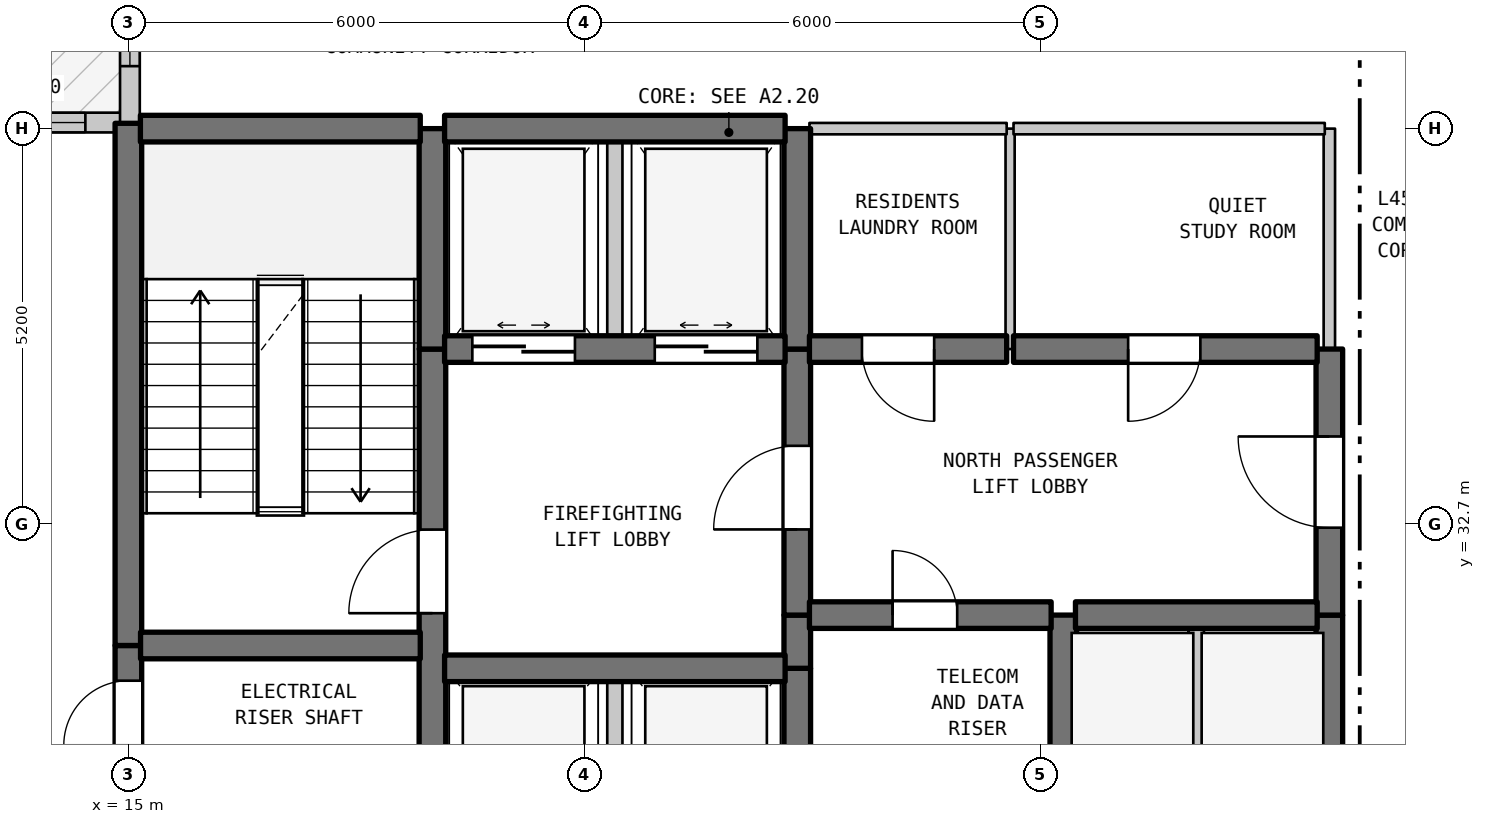
"""IFC4 building model, lengths in metres.
Left out: names, types, materials, properties, quantities, classifications, styles, units other than length and angle.
Written with IfcOpenShell. Run it as: python <this file> out.ifc"""

import sys

from ifc_helpers import new_model, si_unit, direction, frame, frame_2d, origin, place, context, subcontext, project, spatial, rectangle, extrude, element, fill, save


model = new_model("IFC4")
c1 = context("Model", 3, precision=1e-05, world=origin(), true_north=direction((0.0, 1.0)))
c2 = subcontext(c1, "Body", "Model", "MODEL_VIEW")
j1 = project(units=[si_unit("LENGTHUNIT", "METRE"), si_unit("PLANEANGLEUNIT", "RADIAN")], contexts=[c1])
p1 = place(None, origin())
s1 = spatial("IfcSite", under=j1, at=p1, CompositionType="ELEMENT")
p2 = place(p1, origin())
s2 = spatial("IfcBuilding", under=s1, at=p2, CompositionType="ELEMENT")
p3 = place(p2, frame((0.0, 0.0, 183.9)))
s3 = spatial("IfcBuildingStorey", under=s2, at=p3, CompositionType="ELEMENT", Elevation=183.9)
p4 = place(p3, frame((8.877, 37.98, 0.0), z_axis=(0.0, 0.0, 1.0), x_axis=(1.0, 0.0, 0.0)))
e1 = element("IfcWall", 1, at=p4, inside=s3, PredefinedType="STANDARD", context=c2, shape_type="SweptSolid", body=[
    extrude(rectangle(XDim=6.143, YDim=0.26, at=frame_2d((3.072, 0.0))), origin(), (0.0, 0.0, 1.0), 3.89),
])
p5 = place(p4, frame((1.424, 0.0, 0.0)))
e2 = element("IfcOpeningElement", 2, at=p5, cuts=e1, PredefinedType="OPENING", context=c2, shape_type="SweptSolid", body=[
    extrude(rectangle(XDim=1.4, YDim=2.2, at=frame_2d((0.7, 1.1))), frame((0.0, 0.14, 0.0), z_axis=(0.0, -1.0, 0.0), x_axis=(1.0, 0.0, 0.0)), (0.0, 0.0, 1.0), 0.28),
])
p6 = place(p4, frame((4.157, 0.0, 0.9)))
e3 = element("IfcOpeningElement", 3, at=p6, cuts=e1, PredefinedType="OPENING", context=c2, shape_type="SweptSolid", body=[
    extrude(rectangle(XDim=1.4, YDim=1.85, at=frame_2d((0.7, 0.925))), frame((0.0, 0.14, 0.0), z_axis=(0.0, -1.0, 0.0), x_axis=(1.0, 0.0, 0.0)), (0.0, 0.0, 1.0), 0.28),
])
p7 = place(p3, frame((15.02, 37.98, 0.0), z_axis=(0.0, 0.0, 1.0), x_axis=(0.0, 1.0, 0.0)))
e4 = element("IfcWall", 4, at=p7, inside=s3, PredefinedType="STANDARD", context=c2, shape_type="SweptSolid", body=[
    extrude(rectangle(XDim=15.276, YDim=0.26, at=frame_2d((7.638, 0.0))), origin(), (0.0, 0.0, 1.0), 4.19),
])
p8 = place(p7, frame((0.742, 0.0, 0.85)))
e5 = element("IfcOpeningElement", 5, at=p8, cuts=e4, PredefinedType="OPENING", context=c2, shape_type="SweptSolid", body=[
    extrude(rectangle(XDim=1.3, YDim=1.9, at=frame_2d((0.65, 0.95))), frame((0.0, 0.14, 0.0), z_axis=(0.0, -1.0, 0.0), x_axis=(1.0, 0.0, 0.0)), (0.0, 0.0, 1.0), 0.28),
])
p9 = place(p7, frame((5.276, 0.0, 0.85)))
e6 = element("IfcOpeningElement", 6, at=p9, cuts=e4, PredefinedType="OPENING", context=c2, shape_type="SweptSolid", body=[
    extrude(rectangle(XDim=1.3, YDim=1.9, at=frame_2d((0.65, 0.95))), frame((0.0, 0.14, 0.0), z_axis=(0.0, -1.0, 0.0), x_axis=(1.0, 0.0, 0.0)), (0.0, 0.0, 1.0), 0.28),
])
p10 = place(p7, frame((8.96, 0.0, 0.85)))
e7 = element("IfcOpeningElement", 7, at=p10, cuts=e4, PredefinedType="OPENING", context=c2, shape_type="SweptSolid", body=[
    extrude(rectangle(XDim=1.3, YDim=1.9, at=frame_2d((0.65, 0.95))), frame((0.0, 0.14, 0.0), z_axis=(0.0, -1.0, 0.0), x_axis=(1.0, 0.0, 0.0)), (0.0, 0.0, 1.0), 0.28),
])
p11 = place(p7, frame((12.644, 0.0, 0.85)))
e8 = element("IfcOpeningElement", 8, at=p11, cuts=e4, PredefinedType="OPENING", context=c2, shape_type="SweptSolid", body=[
    extrude(rectangle(XDim=1.3, YDim=1.9, at=frame_2d((0.65, 0.95))), frame((0.0, 0.14, 0.0), z_axis=(0.0, -1.0, 0.0), x_axis=(1.0, 0.0, 0.0)), (0.0, 0.0, 1.0), 0.28),
])
p12 = place(p3, frame((15.0, 29.5, 0.0), z_axis=(0.0, 0.0, 1.0), x_axis=(0.0, 1.0, 0.0)))
e9 = element("IfcWall", 9, at=p12, inside=s3, PredefinedType="SHEAR", context=c2, shape_type="SweptSolid", body=[
    extrude(rectangle(XDim=1.6, YDim=0.35, at=frame_2d((0.8, 0.0))), origin(), (0.0, 0.0, 1.0), 4.19),
])
p13 = place(p12, frame((0.287, 0.0, 0.0)))
e10 = element("IfcOpeningElement", 10, at=p13, cuts=e9, PredefinedType="OPENING", context=c2, shape_type="SweptSolid", body=[
    extrude(rectangle(XDim=0.85, YDim=2.1, at=frame_2d((0.425, 1.05))), frame((0.0, 0.185, 0.0), z_axis=(0.0, -1.0, 0.0), x_axis=(1.0, 0.0, 0.0)), (0.0, 0.0, 1.0), 0.37),
])
p14 = place(p3, frame((15.0, 31.1, 0.0), z_axis=(0.0, 0.0, 1.0), x_axis=(0.0, 1.0, 0.0)))
e11 = element("IfcWall", 11, at=p14, inside=s3, PredefinedType="SHEAR", context=c2, shape_type="SweptSolid", body=[
    extrude(rectangle(XDim=6.87, YDim=0.35, at=frame_2d((3.435, 0.0))), origin(), (0.0, 0.0, 1.0), 4.19),
])
p15 = place(p3, frame((19.0, 29.5, 0.0), z_axis=(0.0, 0.0, 1.0), x_axis=(0.0, 1.0, 0.0)))
e12 = element("IfcWall", 12, at=p15, inside=s3, PredefinedType="SHEAR", context=c2, shape_type="SweptSolid", body=[
    extrude(rectangle(XDim=5.5, YDim=0.35, at=frame_2d((2.75, 0.0))), origin(), (0.0, 0.0, 1.0), 4.19),
])
p16 = place(p15, frame((2.025, 0.0, 0.0)))
e13 = element("IfcOpeningElement", 13, at=p16, cuts=e12, PredefinedType="OPENING", context=c2, shape_type="SweptSolid", body=[
    extrude(rectangle(XDim=1.1, YDim=2.15, at=frame_2d((0.55, 1.075))), frame((0.0, 0.185, 0.0), z_axis=(0.0, -1.0, 0.0), x_axis=(1.0, 0.0, 0.0)), (0.0, 0.0, 1.0), 0.37),
])
p17 = place(p3, frame((19.0, 35.0, 0.0), z_axis=(0.0, 0.0, 1.0), x_axis=(0.0, 1.0, 0.0)))
e14 = element("IfcWall", 14, at=p17, inside=s3, PredefinedType="SHEAR", context=c2, shape_type="SweptSolid", body=[
    extrude(rectangle(XDim=2.9, YDim=0.35, at=frame_2d((1.45, 0.0))), origin(), (0.0, 0.0, 1.0), 4.19),
])
p18 = place(p3, frame((21.4, 28.2, 0.0), z_axis=(0.0, 0.0, 1.0), x_axis=(0.0, 1.0, 0.0)))
e15 = element("IfcWall", 15, at=p18, inside=s3, PredefinedType="STANDARD", context=c2, shape_type="SweptSolid", body=[
    extrude(rectangle(XDim=2.6, YDim=0.2, at=frame_2d((1.3, 0.0))), origin(), (0.0, 0.0, 1.0), 4.19),
])
p19 = place(p3, frame((21.4, 35.0, 0.0), z_axis=(0.0, 0.0, 1.0), x_axis=(0.0, 1.0, 0.0)))
e16 = element("IfcWall", 16, at=p19, inside=s3, PredefinedType="STANDARD", context=c2, shape_type="SweptSolid", body=[
    extrude(rectangle(XDim=2.9, YDim=0.2, at=frame_2d((1.45, 0.0))), origin(), (0.0, 0.0, 1.0), 4.19),
])
p20 = place(p3, frame((23.8, 29.5, 0.0), z_axis=(0.0, 0.0, 1.0), x_axis=(0.0, 1.0, 0.0)))
e17 = element("IfcWall", 17, at=p20, inside=s3, PredefinedType="SHEAR", context=c2, shape_type="SweptSolid", body=[
    extrude(rectangle(XDim=1.3, YDim=0.35, at=frame_2d((0.65, 0.0))), origin(), (0.0, 0.0, 1.0), 4.19),
])
p21 = place(p3, frame((23.8, 30.8, 0.0), z_axis=(0.0, 0.0, 1.0), x_axis=(0.0, 1.0, 0.0)))
e18 = element("IfcWall", 18, at=p21, inside=s3, PredefinedType="SHEAR", context=c2, shape_type="SweptSolid", body=[
    extrude(rectangle(XDim=0.7, YDim=0.35, at=frame_2d((0.35, 0.0))), origin(), (0.0, 0.0, 1.0), 4.19),
])
p22 = place(p3, frame((23.8, 31.5, 0.0), z_axis=(0.0, 0.0, 1.0), x_axis=(0.0, 1.0, 0.0)))
e19 = element("IfcWall", 19, at=p22, inside=s3, PredefinedType="SHEAR", context=c2, shape_type="SweptSolid", body=[
    extrude(rectangle(XDim=3.5, YDim=0.35, at=frame_2d((1.75, 0.0))), origin(), (0.0, 0.0, 1.0), 4.19),
])
p23 = place(p22, frame((1.127, 0.0, 0.0)))
e20 = element("IfcOpeningElement", 20, at=p23, cuts=e19, PredefinedType="OPENING", context=c2, shape_type="SweptSolid", body=[
    extrude(rectangle(XDim=1.1, YDim=2.15, at=frame_2d((0.55, 1.075))), frame((0.0, 0.185, 0.0), z_axis=(0.0, -1.0, 0.0), x_axis=(1.0, 0.0, 0.0)), (0.0, 0.0, 1.0), 0.37),
])
p24 = place(p3, frame((23.8, 35.0, 0.0), z_axis=(0.0, 0.0, 1.0), x_axis=(0.0, 1.0, 0.0)))
e21 = element("IfcWall", 21, at=p24, inside=s3, PredefinedType="SHEAR", context=c2, shape_type="SweptSolid", body=[
    extrude(rectangle(XDim=2.9, YDim=0.35, at=frame_2d((1.45, 0.0))), origin(), (0.0, 0.0, 1.0), 4.19),
])
p25 = place(p3, frame((26.6, 35.0, 0.0), z_axis=(0.0, 0.0, 1.0), x_axis=(0.0, 1.0, 0.0)))
e22 = element("IfcWall", 22, at=p25, inside=s3, PredefinedType="PARTITIONING", context=c2, shape_type="SweptSolid", body=[
    extrude(rectangle(XDim=2.9, YDim=0.12, at=frame_2d((1.45, 0.0))), origin(), (0.0, 0.0, 1.0), 4.19),
])
p26 = place(p3, frame((27.3, 29.5, 0.0), z_axis=(0.0, 0.0, 1.0), x_axis=(0.0, 1.0, 0.0)))
e23 = element("IfcWall", 23, at=p26, inside=s3, PredefinedType="SHEAR", context=c2, shape_type="SweptSolid", body=[
    extrude(rectangle(XDim=2.0, YDim=0.35, at=frame_2d((1.0, 0.0))), origin(), (0.0, 0.0, 1.0), 4.19),
])
p27 = place(p3, frame((29.05, 28.9, 0.0), z_axis=(0.0, 0.0, 1.0), x_axis=(0.0, 1.0, 0.0)))
e24 = element("IfcWall", 24, at=p27, inside=s3, PredefinedType="STANDARD", context=c2, shape_type="SweptSolid", body=[
    extrude(rectangle(XDim=2.6, YDim=0.2, at=frame_2d((1.3, 0.0))), origin(), (0.0, 0.0, 1.0), 4.19),
])
p28 = place(p3, frame((30.8, 28.9, 0.0), z_axis=(0.0, 0.0, 1.0), x_axis=(0.0, 1.0, 0.0)))
e25 = element("IfcWall", 25, at=p28, inside=s3, PredefinedType="SHEAR", context=c2, shape_type="SweptSolid", body=[
    extrude(rectangle(XDim=2.6, YDim=0.35, at=frame_2d((1.3, 0.0))), origin(), (0.0, 0.0, 1.0), 4.19),
])
p29 = place(p3, frame((30.8, 31.5, 0.0), z_axis=(0.0, 0.0, 1.0), x_axis=(0.0, 1.0, 0.0)))
e26 = element("IfcWall", 26, at=p29, inside=s3, PredefinedType="SHEAR", context=c2, shape_type="SweptSolid", body=[
    extrude(rectangle(XDim=3.5, YDim=0.35, at=frame_2d((1.75, 0.0))), origin(), (0.0, 0.0, 1.0), 4.19),
])
p30 = place(p29, frame((1.15, 0.0, 0.0)))
e27 = element("IfcOpeningElement", 27, at=p30, cuts=e26, PredefinedType="OPENING", context=c2, shape_type="SweptSolid", body=[
    extrude(rectangle(XDim=1.2, YDim=2.2, at=frame_2d((0.6, 1.1))), frame((0.0, 0.185, 0.0), z_axis=(0.0, -1.0, 0.0), x_axis=(1.0, 0.0, 0.0)), (0.0, 0.0, 1.0), 0.37),
])
p31 = place(p3, frame((30.8, 35.0, 0.0), z_axis=(0.0, 0.0, 1.0), x_axis=(0.0, 1.0, 0.0)))
e28 = element("IfcWall", 28, at=p31, inside=s3, PredefinedType="STANDARD", context=c2, shape_type="SweptSolid", body=[
    extrude(rectangle(XDim=2.9, YDim=0.15, at=frame_2d((1.45, 0.0))), origin(), (0.0, 0.0, 1.0), 4.19),
])
p32 = place(p3, frame((19.16, 30.8, 0.0), z_axis=(0.0, 0.0, 1.0), x_axis=(1.0, 0.0, 0.0)))
e29 = element("IfcWall", 29, at=p32, inside=s3, PredefinedType="SHEAR", context=c2, shape_type="SweptSolid", body=[
    extrude(rectangle(XDim=4.48, YDim=0.35, at=frame_2d((2.24, 0.0))), origin(), (0.0, 0.0, 1.0), 4.19),
])
p33 = place(p3, frame((15.16, 31.1, 0.0), z_axis=(0.0, 0.0, 1.0), x_axis=(1.0, 0.0, 0.0)))
e30 = element("IfcWall", 30, at=p33, inside=s3, PredefinedType="SHEAR", context=c2, shape_type="SweptSolid", body=[
    extrude(rectangle(XDim=3.68, YDim=0.35, at=frame_2d((1.84, 0.0))), origin(), (0.0, 0.0, 1.0), 4.19),
])
p34 = place(p3, frame((23.96, 31.5, 0.0), z_axis=(0.0, 0.0, 1.0), x_axis=(1.0, 0.0, 0.0)))
e31 = element("IfcWall", 31, at=p34, inside=s3, PredefinedType="SHEAR", context=c2, shape_type="SweptSolid", body=[
    extrude(rectangle(XDim=3.18, YDim=0.35, at=frame_2d((1.59, 0.0))), origin(), (0.0, 0.0, 1.0), 4.19),
])
p35 = place(p34, frame((1.094, 0.0, 0.0)))
e32 = element("IfcOpeningElement", 32, at=p35, cuts=e31, PredefinedType="OPENING", context=c2, shape_type="SweptSolid", body=[
    extrude(rectangle(XDim=0.85, YDim=2.1, at=frame_2d((0.425, 1.05))), frame((0.0, 0.185, 0.0), z_axis=(0.0, -1.0, 0.0), x_axis=(1.0, 0.0, 0.0)), (0.0, 0.0, 1.0), 0.37),
])
p36 = place(p3, frame((27.46, 31.5, 0.0), z_axis=(0.0, 0.0, 1.0), x_axis=(1.0, 0.0, 0.0)))
e33 = element("IfcWall", 33, at=p36, inside=s3, PredefinedType="SHEAR", context=c2, shape_type="SweptSolid", body=[
    extrude(rectangle(XDim=3.18, YDim=0.35, at=frame_2d((1.59, 0.0))), origin(), (0.0, 0.0, 1.0), 4.19),
])
p37 = place(p3, frame((19.16, 35.0, 0.0), z_axis=(0.0, 0.0, 1.0), x_axis=(1.0, 0.0, 0.0)))
e34 = element("IfcWall", 34, at=p37, inside=s3, PredefinedType="SHEAR", context=c2, shape_type="SweptSolid", body=[
    extrude(rectangle(XDim=4.48, YDim=0.35, at=frame_2d((2.24, 0.0))), origin(), (0.0, 0.0, 1.0), 4.19),
])
p38 = place(p37, frame((0.365, 0.0, 0.0)))
e35 = element("IfcOpeningElement", 35, at=p38, cuts=e34, PredefinedType="OPENING", context=c2, shape_type="SweptSolid", body=[
    extrude(rectangle(XDim=1.35, YDim=2.2, at=frame_2d((0.675, 1.1))), frame((0.0, 0.185, 0.0), z_axis=(0.0, -1.0, 0.0), x_axis=(1.0, 0.0, 0.0)), (0.0, 0.0, 1.0), 0.37),
])
p39 = place(p37, frame((2.765, 0.0, 0.0)))
e36 = element("IfcOpeningElement", 36, at=p39, cuts=e34, PredefinedType="OPENING", context=c2, shape_type="SweptSolid", body=[
    extrude(rectangle(XDim=1.35, YDim=2.2, at=frame_2d((0.675, 1.1))), frame((0.0, 0.185, 0.0), z_axis=(0.0, -1.0, 0.0), x_axis=(1.0, 0.0, 0.0)), (0.0, 0.0, 1.0), 0.37),
])
p40 = place(p3, frame((23.96, 35.0, 0.0), z_axis=(0.0, 0.0, 1.0), x_axis=(1.0, 0.0, 0.0)))
e37 = element("IfcWall", 37, at=p40, inside=s3, PredefinedType="SHEAR", context=c2, shape_type="SweptSolid", body=[
    extrude(rectangle(XDim=2.595, YDim=0.35, at=frame_2d((1.297, 0.0))), origin(), (0.0, 0.0, 1.0), 4.19),
])
p41 = place(p40, frame((0.691, 0.0, 0.0)))
e38 = element("IfcOpeningElement", 38, at=p41, cuts=e37, PredefinedType="OPENING", context=c2, shape_type="SweptSolid", body=[
    extrude(rectangle(XDim=0.95, YDim=2.15, at=frame_2d((0.475, 1.075))), frame((0.0, 0.185, 0.0), z_axis=(0.0, -1.0, 0.0), x_axis=(1.0, 0.0, 0.0)), (0.0, 0.0, 1.0), 0.37),
])
p42 = place(p3, frame((26.645, 35.0, 0.0), z_axis=(0.0, 0.0, 1.0), x_axis=(1.0, 0.0, 0.0)))
e39 = element("IfcWall", 39, at=p42, inside=s3, PredefinedType="SHEAR", context=c2, shape_type="SweptSolid", body=[
    extrude(rectangle(XDim=3.995, YDim=0.35, at=frame_2d((1.998, 0.0))), origin(), (0.0, 0.0, 1.0), 4.19),
])
p43 = place(p42, frame((1.508, 0.0, 0.0)))
e40 = element("IfcOpeningElement", 40, at=p43, cuts=e39, PredefinedType="OPENING", context=c2, shape_type="SweptSolid", body=[
    extrude(rectangle(XDim=0.95, YDim=2.15, at=frame_2d((0.475, 1.075))), frame((0.0, 0.185, 0.0), z_axis=(0.0, -1.0, 0.0), x_axis=(1.0, 0.0, 0.0)), (0.0, 0.0, 1.0), 0.37),
])
p44 = place(p3, frame((15.158, 37.9, 0.0), z_axis=(0.0, 0.0, 1.0), x_axis=(1.0, 0.0, 0.0)))
e41 = element("IfcWall", 41, at=p44, inside=s3, PredefinedType="SHEAR", context=c2, shape_type="SweptSolid", body=[
    extrude(rectangle(XDim=3.682, YDim=0.35, at=frame_2d((1.841, 0.0))), origin(), (0.0, 0.0, 1.0), 4.19),
])
p45 = place(p3, frame((19.16, 37.9, 0.0), z_axis=(0.0, 0.0, 1.0), x_axis=(1.0, 0.0, 0.0)))
e42 = element("IfcWall", 42, at=p45, inside=s3, PredefinedType="SHEAR", context=c2, shape_type="SweptSolid", body=[
    extrude(rectangle(XDim=4.48, YDim=0.35, at=frame_2d((2.24, 0.0))), origin(), (0.0, 0.0, 1.0), 4.19),
])
p46 = place(p3, frame((23.96, 37.9, 0.0), z_axis=(0.0, 0.0, 1.0), x_axis=(1.0, 0.0, 0.0)))
e43 = element("IfcWall", 43, at=p46, inside=s3, PredefinedType="STANDARD", context=c2, shape_type="SweptSolid", body=[
    extrude(rectangle(XDim=2.595, YDim=0.15, at=frame_2d((1.297, 0.0))), origin(), (0.0, 0.0, 1.0), 3.69),
])
p47 = place(p3, frame((26.645, 37.9, 0.0), z_axis=(0.0, 0.0, 1.0), x_axis=(1.0, 0.0, 0.0)))
e44 = element("IfcWall", 44, at=p47, inside=s3, PredefinedType="STANDARD", context=c2, shape_type="SweptSolid", body=[
    extrude(rectangle(XDim=4.095, YDim=0.15, at=frame_2d((2.047, 0.0))), origin(), (0.0, 0.0, 1.0), 3.69),
])
p48 = place(p6, origin())
e45 = element("IfcWindow", 45, at=p48, inside=s3, PartitioningType="SINGLE_PANEL", PredefinedType="WINDOW", context=c2, shape_type="SweptSolid", body=[
    extrude(rectangle(XDim=1.4, YDim=1.85, at=frame_2d((0.7, 0.925))), frame((0.0, 0.03, 0.0), z_axis=(0.0, -1.0, 0.0), x_axis=(1.0, 0.0, 0.0)), (0.0, 0.0, 1.0), 0.06),
])
fill(e3, e45)
p49 = place(p8, origin())
e46 = element("IfcWindow", 46, at=p49, inside=s3, PartitioningType="SINGLE_PANEL", PredefinedType="WINDOW", context=c2, shape_type="SweptSolid", body=[
    extrude(rectangle(XDim=1.3, YDim=1.9, at=frame_2d((0.65, 0.95))), frame((0.0, 0.03, 0.0), z_axis=(0.0, -1.0, 0.0), x_axis=(1.0, 0.0, 0.0)), (0.0, 0.0, 1.0), 0.06),
])
fill(e5, e46)
p50 = place(p13, origin())
e47 = element("IfcDoor", 47, at=p50, inside=s3, OperationType="SINGLE_SWING_LEFT", PredefinedType="DOOR", context=c2, shape_type="SweptSolid", body=[
    extrude(rectangle(XDim=0.85, YDim=2.1, at=frame_2d((0.425, 1.05))), frame((0.0, 0.025, 0.0), z_axis=(0.0, -1.0, 0.0), x_axis=(1.0, 0.0, 0.0)), (0.0, 0.0, 1.0), 0.05),
])
fill(e10, e47)
p51 = place(p16, origin())
e48 = element("IfcDoor", 48, at=p51, inside=s3, OperationType="SINGLE_SWING_LEFT", PredefinedType="DOOR", context=c2, shape_type="SweptSolid", body=[
    extrude(rectangle(XDim=1.1, YDim=2.15, at=frame_2d((0.55, 1.075))), frame((0.0, 0.025, 0.0), z_axis=(0.0, -1.0, 0.0), x_axis=(1.0, 0.0, 0.0)), (0.0, 0.0, 1.0), 0.05),
])
fill(e13, e48)
p52 = place(p23, origin())
e49 = element("IfcDoor", 49, at=p52, inside=s3, OperationType="SINGLE_SWING_LEFT", PredefinedType="DOOR", context=c2, shape_type="SweptSolid", body=[
    extrude(rectangle(XDim=1.1, YDim=2.15, at=frame_2d((0.55, 1.075))), frame((0.0, 0.025, 0.0), z_axis=(0.0, -1.0, 0.0), x_axis=(1.0, 0.0, 0.0)), (0.0, 0.0, 1.0), 0.05),
])
fill(e20, e49)
p53 = place(p30, origin())
e50 = element("IfcDoor", 50, at=p53, inside=s3, OperationType="SINGLE_SWING_RIGHT", PredefinedType="DOOR", context=c2, shape_type="SweptSolid", body=[
    extrude(rectangle(XDim=1.2, YDim=2.2, at=frame_2d((0.6, 1.1))), frame((0.0, 0.025, 0.0), z_axis=(0.0, -1.0, 0.0), x_axis=(1.0, 0.0, 0.0)), (0.0, 0.0, 1.0), 0.05),
])
fill(e27, e50)
p54 = place(p35, origin())
e51 = element("IfcDoor", 51, at=p54, inside=s3, OperationType="SINGLE_SWING_LEFT", PredefinedType="DOOR", context=c2, shape_type="SweptSolid", body=[
    extrude(rectangle(XDim=0.85, YDim=2.1, at=frame_2d((0.425, 1.05))), frame((0.0, 0.025, 0.0), z_axis=(0.0, -1.0, 0.0), x_axis=(1.0, 0.0, 0.0)), (0.0, 0.0, 1.0), 0.05),
])
fill(e32, e51)
p55 = place(p38, origin())
e52 = element("IfcDoor", 52, at=p55, inside=s3, OperationType="DOUBLE_DOOR_SLIDING", PredefinedType="DOOR", context=c2, shape_type="SweptSolid", body=[
    extrude(rectangle(XDim=1.35, YDim=2.2, at=frame_2d((0.675, 1.1))), frame((0.0, 0.025, 0.0), z_axis=(0.0, -1.0, 0.0), x_axis=(1.0, 0.0, 0.0)), (0.0, 0.0, 1.0), 0.05),
])
fill(e35, e52)
p56 = place(p39, origin())
e53 = element("IfcDoor", 53, at=p56, inside=s3, OperationType="DOUBLE_DOOR_SLIDING", PredefinedType="DOOR", context=c2, shape_type="SweptSolid", body=[
    extrude(rectangle(XDim=1.35, YDim=2.2, at=frame_2d((0.675, 1.1))), frame((0.0, 0.025, 0.0), z_axis=(0.0, -1.0, 0.0), x_axis=(1.0, 0.0, 0.0)), (0.0, 0.0, 1.0), 0.05),
])
fill(e36, e53)
p57 = place(p41, frame((0.95, 0.0, 0.0), z_axis=(0.0, 0.0, 1.0), x_axis=(-1.0, 0.0, 0.0)))
e54 = element("IfcDoor", 54, at=p57, inside=s3, OperationType="SINGLE_SWING_RIGHT", PredefinedType="DOOR", context=c2, shape_type="SweptSolid", body=[
    extrude(rectangle(XDim=0.95, YDim=2.15, at=frame_2d((0.475, 1.075))), frame((0.0, 0.025, 0.0), z_axis=(0.0, -1.0, 0.0), x_axis=(1.0, 0.0, 0.0)), (0.0, 0.0, 1.0), 0.05),
])
fill(e38, e54)
p58 = place(p43, frame((0.95, 0.0, 0.0), z_axis=(0.0, 0.0, 1.0), x_axis=(-1.0, 0.0, 0.0)))
e55 = element("IfcDoor", 55, at=p58, inside=s3, OperationType="SINGLE_SWING_LEFT", PredefinedType="DOOR", context=c2, shape_type="SweptSolid", body=[
    extrude(rectangle(XDim=0.95, YDim=2.15, at=frame_2d((0.475, 1.075))), frame((0.0, 0.025, 0.0), z_axis=(0.0, -1.0, 0.0), x_axis=(1.0, 0.0, 0.0)), (0.0, 0.0, 1.0), 0.05),
])
fill(e40, e55)
save(model, sys.argv[1])
